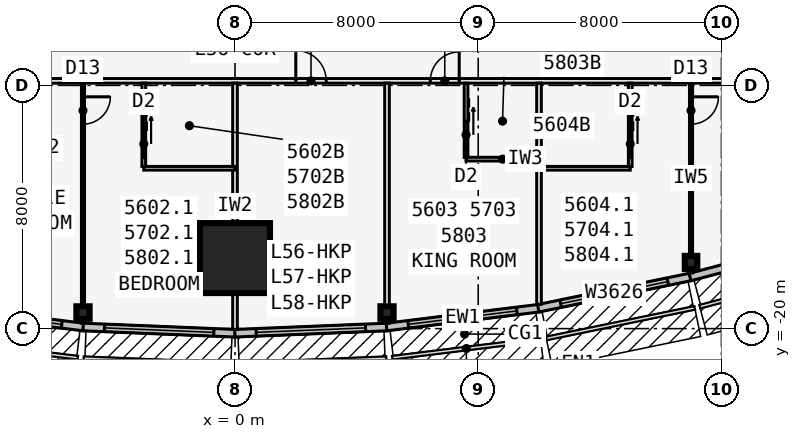
"""IFC4 building model, lengths in metres.
Left out: names, types, materials, properties, quantities, classifications, styles, units other than length and angle.
Written with IfcOpenShell. Run it as: python <this file> out.ifc"""

import sys

from ifc_helpers import new_model, si_unit, direction, frame, frame_2d, origin, origin_2d, place, context, subcontext, project, spatial, rectangle, i_section, extrude, element, fill, save


model = new_model("IFC4")
c1 = context("Model", 3, precision=1e-05, world=origin(), true_north=direction((0.0, 1.0)))
c2 = subcontext(c1, "Body", "Model", "MODEL_VIEW")
j1 = project(units=[si_unit("LENGTHUNIT", "METRE"), si_unit("PLANEANGLEUNIT", "RADIAN")], contexts=[c1])
p1 = place(None, origin())
s1 = spatial("IfcSite", under=j1, at=p1, CompositionType="ELEMENT")
p2 = place(p1, origin())
s2 = spatial("IfcBuilding", under=s1, at=p2, CompositionType="ELEMENT")
p3 = place(p2, frame((0.0, 0.0, 211.7)))
s3 = spatial("IfcBuildingStorey", under=s2, at=p3, CompositionType="ELEMENT", Elevation=211.7)
for number, where, z_axis, x_axis in (
    (1, (-5.0, -19.472, 0.0), (0.0, 0.0, 1.0), (0.0, -1.0, 0.0)),
    (2, (5.0, -19.472, 0.0), (0.0, 0.0, 1.0), (0.0, -1.0, 0.0)),
    (3, (15.0, -17.825, 0.0), (0.0, 0.0, 1.0), (1.0, 0.0, 0.0)),
):
    element("IfcColumn", number, at=place(p3, frame(where, z_axis=z_axis, x_axis=x_axis)), inside=s3, PredefinedType="COLUMN", context=c2, shape_type="SweptSolid", body=[
        extrude(i_section(OverallWidth=0.411, OverallDepth=0.434, WebThickness=0.036, FlangeThickness=0.057, at=origin_2d()), origin(), (0.0, 0.0, 1.0), 3.6),
    ])
p4 = place(p3, frame((0.0, -17.68, 0.0), z_axis=(0.0, 0.0, 1.0), x_axis=(0.0, -1.0, 0.0)))
e4 = element("IfcColumn", 4, at=p4, inside=s3, PredefinedType="COLUMN", context=c2, shape_type="SweptSolid", body=[
    extrude(rectangle(XDim=2.3, YDim=2.3, at=origin_2d()), origin(), (0.0, 0.0, 1.0), 3.6),
])
p5 = place(p3, frame((-9.985, -19.33, 0.0), z_axis=(0.0, 0.0, 1.0), x_axis=(0.992449874964, -0.12265090984, 0.0)))
e5 = element("IfcWall", 5, at=p5, inside=s3, PredefinedType="STANDARD", context=c2, shape_type="SweptSolid", body=[
    extrude(rectangle(XDim=5.038, YDim=0.25, at=frame_2d((2.519, 0.0))), origin(), (0.0, 0.0, 1.0), 3.435),
])
p6 = place(p5, frame((0.719, 0.0, 0.45)))
e6 = element("IfcOpeningElement", 6, at=p6, cuts=e5, PredefinedType="OPENING", context=c2, shape_type="SweptSolid", body=[
    extrude(rectangle(XDim=3.6, YDim=2.6, at=frame_2d((1.8, 1.3))), frame((0.0, 0.135, 0.0), z_axis=(0.0, -1.0, 0.0), x_axis=(1.0, 0.0, 0.0)), (0.0, 0.0, 1.0), 0.27),
])
p7 = place(p3, frame((-4.995, -19.947, 0.0), z_axis=(0.0, 0.0, 1.0), x_axis=(0.999151909423, -0.041175986892, 0.0)))
e7 = element("IfcWall", 7, at=p7, inside=s3, PredefinedType="STANDARD", context=c2, shape_type="SweptSolid", body=[
    extrude(rectangle(XDim=5.004, YDim=0.25, at=frame_2d((2.502, 0.0))), origin(), (0.0, 0.0, 1.0), 3.435),
])
p8 = place(p7, frame((0.702, 0.0, 0.45)))
e8 = element("IfcOpeningElement", 8, at=p8, cuts=e7, PredefinedType="OPENING", context=c2, shape_type="SweptSolid", body=[
    extrude(rectangle(XDim=3.6, YDim=2.6, at=frame_2d((1.8, 1.3))), frame((0.0, 0.135, 0.0), z_axis=(0.0, -1.0, 0.0), x_axis=(1.0, 0.0, 0.0)), (0.0, 0.0, 1.0), 0.27),
])
p9 = place(p3, frame((-0.005, -20.153, 0.0), z_axis=(0.0, 0.0, 1.0), x_axis=(0.999151909423, 0.041175986892, 0.0)))
e9 = element("IfcWall", 9, at=p9, inside=s3, PredefinedType="STANDARD", context=c2, shape_type="SweptSolid", body=[
    extrude(rectangle(XDim=5.004, YDim=0.25, at=frame_2d((2.502, 0.0))), origin(), (0.0, 0.0, 1.0), 3.435),
])
p10 = place(p9, frame((0.702, 0.0, 0.45)))
e10 = element("IfcOpeningElement", 10, at=p10, cuts=e9, PredefinedType="OPENING", context=c2, shape_type="SweptSolid", body=[
    extrude(rectangle(XDim=3.6, YDim=2.6, at=frame_2d((1.8, 1.3))), frame((0.0, 0.135, 0.0), z_axis=(0.0, -1.0, 0.0), x_axis=(1.0, 0.0, 0.0)), (0.0, 0.0, 1.0), 0.27),
])
p11 = place(p3, frame((4.985, -19.948, 0.0), z_axis=(0.0, 0.0, 1.0), x_axis=(0.992449874964, 0.12265090984, 0.0)))
e11 = element("IfcWall", 11, at=p11, inside=s3, PredefinedType="STANDARD", context=c2, shape_type="SweptSolid", body=[
    extrude(rectangle(XDim=5.038, YDim=0.25, at=frame_2d((2.519, 0.0))), origin(), (0.0, 0.0, 1.0), 3.435),
])
p12 = place(p11, frame((0.719, 0.0, 0.45)))
e12 = element("IfcOpeningElement", 12, at=p12, cuts=e11, PredefinedType="OPENING", context=c2, shape_type="SweptSolid", body=[
    extrude(rectangle(XDim=3.6, YDim=2.6, at=frame_2d((1.8, 1.3))), frame((0.0, 0.135, 0.0), z_axis=(0.0, -1.0, 0.0), x_axis=(1.0, 0.0, 0.0)), (0.0, 0.0, 1.0), 0.27),
])
p13 = place(p3, frame((9.975, -19.332, 0.0), z_axis=(0.0, 0.0, 1.0), x_axis=(0.979461488189, 0.201631329795, 0.0)))
e13 = element("IfcWall", 13, at=p13, inside=s3, PredefinedType="STANDARD", context=c2, shape_type="SweptSolid", body=[
    extrude(rectangle(XDim=5.105, YDim=0.25, at=frame_2d((2.552, 0.0))), origin(), (0.0, 0.0, 1.0), 3.435),
])
p14 = place(p13, frame((0.752, 0.0, 0.45)))
e14 = element("IfcOpeningElement", 14, at=p14, cuts=e13, PredefinedType="OPENING", context=c2, shape_type="SweptSolid", body=[
    extrude(rectangle(XDim=3.6, YDim=2.6, at=frame_2d((1.8, 1.3))), frame((0.0, 0.135, 0.0), z_axis=(0.0, -1.0, 0.0), x_axis=(1.0, 0.0, 0.0)), (0.0, 0.0, 1.0), 0.27),
])
p15 = place(p3, frame((14.968, -18.304, 0.0), z_axis=(0.0, 0.0, 1.0), x_axis=(0.967010286052, 0.254737328772, 0.0)))
e15 = element("IfcWall", 15, at=p15, inside=s3, PredefinedType="STANDARD", context=c2, shape_type="SweptSolid", body=[
    extrude(rectangle(XDim=2.068, YDim=0.25, at=frame_2d((1.034, 0.0))), origin(), (0.0, 0.0, 1.0), 3.435),
])
p16 = place(p3, frame((-19.677, -11.851, 0.0), z_axis=(0.0, 0.0, 1.0), x_axis=(1.0, 0.0, 0.0)))
e16 = element("IfcWall", 16, at=p16, inside=s3, PredefinedType="PARTITIONING", context=c2, shape_type="SweptSolid", body=[
    extrude(rectangle(XDim=39.354, YDim=0.15, at=frame_2d((19.677, 0.0))), origin(), (0.0, 0.0, 1.0), 3.435),
])
p17 = place(p16, frame((1.665, 0.0, 0.0)))
e17 = element("IfcOpeningElement", 17, at=p17, cuts=e16, PredefinedType="OPENING", context=c2, shape_type="SweptSolid", body=[
    extrude(rectangle(XDim=0.95, YDim=2.13, at=frame_2d((0.475, 1.065))), frame((0.0, 0.085, 0.0), z_axis=(0.0, -1.0, 0.0), x_axis=(1.0, 0.0, 0.0)), (0.0, 0.0, 1.0), 0.17),
])
p18 = place(p16, frame((11.702, 0.0, 0.0)))
e18 = element("IfcOpeningElement", 18, at=p18, cuts=e16, PredefinedType="OPENING", context=c2, shape_type="SweptSolid", body=[
    extrude(rectangle(XDim=0.95, YDim=2.13, at=frame_2d((0.475, 1.065))), frame((0.0, 0.085, 0.0), z_axis=(0.0, -1.0, 0.0), x_axis=(1.0, 0.0, 0.0)), (0.0, 0.0, 1.0), 0.17),
])
p19 = place(p16, frame((21.677, 0.0, 0.0)))
e19 = element("IfcOpeningElement", 19, at=p19, cuts=e16, PredefinedType="OPENING", context=c2, shape_type="SweptSolid", body=[
    extrude(rectangle(XDim=1.0, YDim=2.13, at=frame_2d((0.5, 1.065))), frame((0.0, 0.085, 0.0), z_axis=(0.0, -1.0, 0.0), x_axis=(1.0, 0.0, 0.0)), (0.0, 0.0, 1.0), 0.17),
])
p20 = place(p16, frame((26.102, 0.0, 0.0)))
e20 = element("IfcOpeningElement", 20, at=p20, cuts=e16, PredefinedType="OPENING", context=c2, shape_type="SweptSolid", body=[
    extrude(rectangle(XDim=0.95, YDim=2.13, at=frame_2d((0.475, 1.065))), frame((0.0, 0.085, 0.0), z_axis=(0.0, -1.0, 0.0), x_axis=(1.0, 0.0, 0.0)), (0.0, 0.0, 1.0), 0.17),
])
p21 = place(p16, frame((36.739, 0.0, 0.0)))
e21 = element("IfcOpeningElement", 21, at=p21, cuts=e16, PredefinedType="OPENING", context=c2, shape_type="SweptSolid", body=[
    extrude(rectangle(XDim=0.95, YDim=2.13, at=frame_2d((0.475, 1.065))), frame((0.0, 0.085, 0.0), z_axis=(0.0, -1.0, 0.0), x_axis=(1.0, 0.0, 0.0)), (0.0, 0.0, 1.0), 0.17),
])
p22 = place(p3, frame((-5.0, -11.926, 0.0), z_axis=(0.0, 0.0, 1.0), x_axis=(0.0, -1.0, 0.0)))
e22 = element("IfcWall", 22, at=p22, inside=s3, PredefinedType="PARTITIONING", context=c2, shape_type="SweptSolid", body=[
    extrude(rectangle(XDim=7.894, YDim=0.1, at=frame_2d((3.947, 0.0))), origin(), (0.0, 0.0, 1.0), 2.589),
])
p23 = place(p22, frame((0.45, 0.0, 0.0)))
e23 = element("IfcOpeningElement", 23, at=p23, cuts=e22, PredefinedType="OPENING", context=c2, shape_type="SweptSolid", body=[
    extrude(rectangle(XDim=0.9, YDim=2.13, at=frame_2d((0.45, 1.065))), frame((0.0, 0.06, 0.0), z_axis=(0.0, -1.0, 0.0), x_axis=(1.0, 0.0, 0.0)), (0.0, 0.0, 1.0), 0.12),
])
p24 = place(p3, frame((0.0, -11.926, 0.0), z_axis=(0.0, 0.0, 1.0), x_axis=(0.0, -1.0, 0.0)))
e24 = element("IfcWall", 24, at=p24, inside=s3, PredefinedType="PARTITIONING", context=c2, shape_type="SweptSolid", body=[
    extrude(rectangle(XDim=8.101, YDim=0.15, at=frame_2d((4.051, 0.0))), origin(), (0.0, 0.0, 1.0), 2.589),
])
p25 = place(p3, frame((5.0, -11.926, 0.0), z_axis=(0.0, 0.0, 1.0), x_axis=(0.0, -1.0, 0.0)))
e25 = element("IfcWall", 25, at=p25, inside=s3, PredefinedType="PARTITIONING", context=c2, shape_type="SweptSolid", body=[
    extrude(rectangle(XDim=7.894, YDim=0.15, at=frame_2d((3.947, 0.0))), origin(), (0.0, 0.0, 1.0), 2.589),
])
p26 = place(p3, frame((10.0, -11.926, 0.0), z_axis=(0.0, 0.0, 1.0), x_axis=(0.0, -1.0, 0.0)))
e26 = element("IfcWall", 26, at=p26, inside=s3, PredefinedType="PARTITIONING", context=c2, shape_type="SweptSolid", body=[
    extrude(rectangle(XDim=7.273, YDim=0.15, at=frame_2d((3.636, 0.0))), origin(), (0.0, 0.0, 1.0), 2.589),
])
p27 = place(p3, frame((15.0, -11.926, 0.0), z_axis=(0.0, 0.0, 1.0), x_axis=(0.0, -1.0, 0.0)))
e27 = element("IfcWall", 27, at=p27, inside=s3, PredefinedType="PARTITIONING", context=c2, shape_type="SweptSolid", body=[
    extrude(rectangle(XDim=6.24, YDim=0.1, at=frame_2d((3.12, 0.0))), origin(), (0.0, 0.0, 1.0), 2.589),
])
p28 = place(p27, frame((0.45, 0.0, 0.0)))
e28 = element("IfcOpeningElement", 28, at=p28, cuts=e27, PredefinedType="OPENING", context=c2, shape_type="SweptSolid", body=[
    extrude(rectangle(XDim=0.9, YDim=2.13, at=frame_2d((0.45, 1.065))), frame((0.0, 0.06, 0.0), z_axis=(0.0, -1.0, 0.0), x_axis=(1.0, 0.0, 0.0)), (0.0, 0.0, 1.0), 0.12),
])
p29 = place(p3, frame((-3.0, -14.726, 0.0), z_axis=(0.0, 0.0, 1.0), x_axis=(1.0, 0.0, 0.0)))
e29 = element("IfcWall", 29, at=p29, inside=s3, PredefinedType="PLUMBINGWALL", context=c2, shape_type="SweptSolid", body=[
    extrude(rectangle(XDim=3.0, YDim=0.12, at=frame_2d((1.5, 0.0))), origin(), (0.0, 0.0, 1.0), 3.435),
])
p30 = place(p3, frame((-3.0, -11.926, 0.0), z_axis=(0.0, 0.0, 1.0), x_axis=(0.0, -1.0, 0.0)))
e30 = element("IfcWall", 30, at=p30, inside=s3, PredefinedType="PLUMBINGWALL", context=c2, shape_type="SweptSolid", body=[
    extrude(rectangle(XDim=2.74, YDim=0.12, at=frame_2d((1.37, 0.0))), origin(), (0.0, 0.0, 1.0), 3.435),
])
p31 = place(p30, frame((1.55, 0.0, 0.0)))
e31 = element("IfcOpeningElement", 31, at=p31, cuts=e30, PredefinedType="OPENING", context=c2, shape_type="SweptSolid", body=[
    extrude(rectangle(XDim=0.9, YDim=2.13, at=frame_2d((0.45, 1.065))), frame((0.0, 0.07, 0.0), z_axis=(0.0, -1.0, 0.0), x_axis=(1.0, 0.0, 0.0)), (0.0, 0.0, 1.0), 0.14),
])
p32 = place(p3, frame((7.6, -14.426, 0.0), z_axis=(0.0, 0.0, 1.0), x_axis=(1.0, 0.0, 0.0)))
e32 = element("IfcWall", 32, at=p32, inside=s3, PredefinedType="PLUMBINGWALL", context=c2, shape_type="SweptSolid", body=[
    extrude(rectangle(XDim=2.4, YDim=0.12, at=frame_2d((1.2, 0.0))), origin(), (0.0, 0.0, 1.0), 3.435),
])
p33 = place(p3, frame((7.6, -11.926, 0.0), z_axis=(0.0, 0.0, 1.0), x_axis=(0.0, -1.0, 0.0)))
e33 = element("IfcWall", 33, at=p33, inside=s3, PredefinedType="PLUMBINGWALL", context=c2, shape_type="SweptSolid", body=[
    extrude(rectangle(XDim=2.44, YDim=0.12, at=frame_2d((1.22, 0.0))), origin(), (0.0, 0.0, 1.0), 3.435),
])
p34 = place(p33, frame((1.25, 0.0, 0.0)))
e34 = element("IfcOpeningElement", 34, at=p34, cuts=e33, PredefinedType="OPENING", context=c2, shape_type="SweptSolid", body=[
    extrude(rectangle(XDim=0.9, YDim=2.13, at=frame_2d((0.45, 1.065))), frame((0.0, 0.07, 0.0), z_axis=(0.0, -1.0, 0.0), x_axis=(1.0, 0.0, 0.0)), (0.0, 0.0, 1.0), 0.14),
])
p35 = place(p3, frame((10.0, -14.726, 0.0), z_axis=(0.0, 0.0, 1.0), x_axis=(1.0, 0.0, 0.0)))
e35 = element("IfcWall", 35, at=p35, inside=s3, PredefinedType="PLUMBINGWALL", context=c2, shape_type="SweptSolid", body=[
    extrude(rectangle(XDim=3.0, YDim=0.12, at=frame_2d((1.5, 0.0))), origin(), (0.0, 0.0, 1.0), 3.435),
])
p36 = place(p3, frame((13.0, -11.926, 0.0), z_axis=(0.0, 0.0, 1.0), x_axis=(0.0, -1.0, 0.0)))
e36 = element("IfcWall", 36, at=p36, inside=s3, PredefinedType="PLUMBINGWALL", context=c2, shape_type="SweptSolid", body=[
    extrude(rectangle(XDim=2.74, YDim=0.12, at=frame_2d((1.37, 0.0))), origin(), (0.0, 0.0, 1.0), 3.435),
])
p37 = place(p36, frame((1.55, 0.0, 0.0)))
e37 = element("IfcOpeningElement", 37, at=p37, cuts=e36, PredefinedType="OPENING", context=c2, shape_type="SweptSolid", body=[
    extrude(rectangle(XDim=0.9, YDim=2.13, at=frame_2d((0.45, 1.065))), frame((0.0, 0.07, 0.0), z_axis=(0.0, -1.0, 0.0), x_axis=(1.0, 0.0, 0.0)), (0.0, 0.0, 1.0), 0.14),
])
p38 = place(p3, frame((21.661, -12.015, 0.0), z_axis=(0.0, 0.0, 1.0), x_axis=(-0.500000605707, 0.866025054079, 0.0)))
e38 = element("IfcWall", 38, at=p38, inside=s3, PredefinedType="PARTITIONING", context=c2, shape_type="SweptSolid", body=[
    extrude(rectangle(XDim=42.472, YDim=0.15, at=frame_2d((21.236, 0.0))), origin(), (0.0, 0.0, 1.0), 3.435),
])
p39 = place(p38, frame((2.661, 0.0, 0.0)))
e39 = element("IfcOpeningElement", 39, at=p39, cuts=e38, PredefinedType="OPENING", context=c2, shape_type="SweptSolid", body=[
    extrude(rectangle(XDim=0.95, YDim=2.13, at=frame_2d((0.475, 1.065))), frame((0.0, 0.085, 0.0), z_axis=(0.0, -1.0, 0.0), x_axis=(1.0, 0.0, 0.0)), (0.0, 0.0, 1.0), 0.17),
])
p40 = place(p38, frame((7.061, 0.0, 0.0)))
e40 = element("IfcOpeningElement", 40, at=p40, cuts=e38, PredefinedType="OPENING", context=c2, shape_type="SweptSolid", body=[
    extrude(rectangle(XDim=0.95, YDim=2.13, at=frame_2d((0.475, 1.065))), frame((0.0, 0.085, 0.0), z_axis=(0.0, -1.0, 0.0), x_axis=(1.0, 0.0, 0.0)), (0.0, 0.0, 1.0), 0.17),
])
p41 = place(p38, frame((13.861, 0.0, 0.0)))
e41 = element("IfcOpeningElement", 41, at=p41, cuts=e38, PredefinedType="OPENING", context=c2, shape_type="SweptSolid", body=[
    extrude(rectangle(XDim=0.95, YDim=2.13, at=frame_2d((0.475, 1.065))), frame((0.0, 0.085, 0.0), z_axis=(0.0, -1.0, 0.0), x_axis=(1.0, 0.0, 0.0)), (0.0, 0.0, 1.0), 0.17),
])
p42 = place(p38, frame((22.061, 0.0, 0.0)))
e42 = element("IfcOpeningElement", 42, at=p42, cuts=e38, PredefinedType="OPENING", context=c2, shape_type="SweptSolid", body=[
    extrude(rectangle(XDim=0.95, YDim=2.13, at=frame_2d((0.475, 1.065))), frame((0.0, 0.085, 0.0), z_axis=(0.0, -1.0, 0.0), x_axis=(1.0, 0.0, 0.0)), (0.0, 0.0, 1.0), 0.17),
])
p43 = place(p38, frame((28.261, 0.0, 0.0)))
e43 = element("IfcOpeningElement", 43, at=p43, cuts=e38, PredefinedType="OPENING", context=c2, shape_type="SweptSolid", body=[
    extrude(rectangle(XDim=0.95, YDim=2.13, at=frame_2d((0.475, 1.065))), frame((0.0, 0.085, 0.0), z_axis=(0.0, -1.0, 0.0), x_axis=(1.0, 0.0, 0.0)), (0.0, 0.0, 1.0), 0.17),
])
p44 = place(p38, frame((38.861, 0.0, 0.0)))
e44 = element("IfcOpeningElement", 44, at=p44, cuts=e38, PredefinedType="OPENING", context=c2, shape_type="SweptSolid", body=[
    extrude(rectangle(XDim=0.95, YDim=2.13, at=frame_2d((0.475, 1.065))), frame((0.0, 0.085, 0.0), z_axis=(0.0, -1.0, 0.0), x_axis=(1.0, 0.0, 0.0)), (0.0, 0.0, 1.0), 0.17),
])
p45 = place(p3, frame((-0.425, 22.966, 0.0), z_axis=(0.0, 0.0, 1.0), x_axis=(-0.500000265775, -0.866025250339, 0.0)))
e45 = element("IfcWall", 45, at=p45, inside=s3, PredefinedType="PARTITIONING", context=c2, shape_type="SweptSolid", body=[
    extrude(rectangle(XDim=39.354, YDim=0.15, at=frame_2d((19.677, 0.0))), origin(), (0.0, 0.0, 1.0), 3.435),
])
p46 = place(p45, frame((1.102, 0.0, 0.0)))
e46 = element("IfcOpeningElement", 46, at=p46, cuts=e45, PredefinedType="OPENING", context=c2, shape_type="SweptSolid", body=[
    extrude(rectangle(XDim=0.95, YDim=2.13, at=frame_2d((0.475, 1.065))), frame((0.0, 0.085, 0.0), z_axis=(0.0, -1.0, 0.0), x_axis=(1.0, 0.0, 0.0)), (0.0, 0.0, 1.0), 0.17),
])
p47 = place(p45, frame((6.702, 0.0, 0.0)))
e47 = element("IfcOpeningElement", 47, at=p47, cuts=e45, PredefinedType="OPENING", context=c2, shape_type="SweptSolid", body=[
    extrude(rectangle(XDim=0.95, YDim=2.13, at=frame_2d((0.475, 1.065))), frame((0.0, 0.085, 0.0), z_axis=(0.0, -1.0, 0.0), x_axis=(1.0, 0.0, 0.0)), (0.0, 0.0, 1.0), 0.17),
])
p48 = place(p45, frame((16.702, 0.0, 0.0)))
e48 = element("IfcOpeningElement", 48, at=p48, cuts=e45, PredefinedType="OPENING", context=c2, shape_type="SweptSolid", body=[
    extrude(rectangle(XDim=0.95, YDim=2.13, at=frame_2d((0.475, 1.065))), frame((0.0, 0.085, 0.0), z_axis=(0.0, -1.0, 0.0), x_axis=(1.0, 0.0, 0.0)), (0.0, 0.0, 1.0), 0.17),
])
p49 = place(p45, frame((26.102, 0.0, 0.0)))
e49 = element("IfcOpeningElement", 49, at=p49, cuts=e45, PredefinedType="OPENING", context=c2, shape_type="SweptSolid", body=[
    extrude(rectangle(XDim=0.95, YDim=2.13, at=frame_2d((0.475, 1.065))), frame((0.0, 0.085, 0.0), z_axis=(0.0, -1.0, 0.0), x_axis=(1.0, 0.0, 0.0)), (0.0, 0.0, 1.0), 0.17),
])
p50 = place(p45, frame((32.302, 0.0, 0.0)))
e50 = element("IfcOpeningElement", 50, at=p50, cuts=e45, PredefinedType="OPENING", context=c2, shape_type="SweptSolid", body=[
    extrude(rectangle(XDim=0.95, YDim=2.13, at=frame_2d((0.475, 1.065))), frame((0.0, 0.085, 0.0), z_axis=(0.0, -1.0, 0.0), x_axis=(1.0, 0.0, 0.0)), (0.0, 0.0, 1.0), 0.17),
])
p51 = place(p45, frame((37.302, 0.0, 0.0)))
e51 = element("IfcOpeningElement", 51, at=p51, cuts=e45, PredefinedType="OPENING", context=c2, shape_type="SweptSolid", body=[
    extrude(rectangle(XDim=0.95, YDim=2.13, at=frame_2d((0.475, 1.065))), frame((0.0, 0.085, 0.0), z_axis=(0.0, -1.0, 0.0), x_axis=(1.0, 0.0, 0.0)), (0.0, 0.0, 1.0), 0.17),
])
p52 = place(p6, origin())
e52 = element("IfcWindow", 52, at=p52, inside=s3, PartitioningType="SINGLE_PANEL", PredefinedType="WINDOW", context=c2, shape_type="SweptSolid", body=[
    extrude(rectangle(XDim=3.6, YDim=2.6, at=frame_2d((1.8, 1.3))), frame((0.0, 0.03, 0.0), z_axis=(0.0, -1.0, 0.0), x_axis=(1.0, 0.0, 0.0)), (0.0, 0.0, 1.0), 0.06),
])
fill(e6, e52)
p53 = place(p8, origin())
e53 = element("IfcWindow", 53, at=p53, inside=s3, PartitioningType="SINGLE_PANEL", PredefinedType="WINDOW", context=c2, shape_type="SweptSolid", body=[
    extrude(rectangle(XDim=3.6, YDim=2.6, at=frame_2d((1.8, 1.3))), frame((0.0, 0.03, 0.0), z_axis=(0.0, -1.0, 0.0), x_axis=(1.0, 0.0, 0.0)), (0.0, 0.0, 1.0), 0.06),
])
fill(e8, e53)
p54 = place(p10, origin())
e54 = element("IfcWindow", 54, at=p54, inside=s3, PartitioningType="SINGLE_PANEL", PredefinedType="WINDOW", context=c2, shape_type="SweptSolid", body=[
    extrude(rectangle(XDim=3.6, YDim=2.6, at=frame_2d((1.8, 1.3))), frame((0.0, 0.03, 0.0), z_axis=(0.0, -1.0, 0.0), x_axis=(1.0, 0.0, 0.0)), (0.0, 0.0, 1.0), 0.06),
])
fill(e10, e54)
p55 = place(p12, origin())
e55 = element("IfcWindow", 55, at=p55, inside=s3, PartitioningType="SINGLE_PANEL", PredefinedType="WINDOW", context=c2, shape_type="SweptSolid", body=[
    extrude(rectangle(XDim=3.6, YDim=2.6, at=frame_2d((1.8, 1.3))), frame((0.0, 0.03, 0.0), z_axis=(0.0, -1.0, 0.0), x_axis=(1.0, 0.0, 0.0)), (0.0, 0.0, 1.0), 0.06),
])
fill(e12, e55)
p56 = place(p14, origin())
e56 = element("IfcWindow", 56, at=p56, inside=s3, PartitioningType="SINGLE_PANEL", PredefinedType="WINDOW", context=c2, shape_type="SweptSolid", body=[
    extrude(rectangle(XDim=3.6, YDim=2.6, at=frame_2d((1.8, 1.3))), frame((0.0, 0.03, 0.0), z_axis=(0.0, -1.0, 0.0), x_axis=(1.0, 0.0, 0.0)), (0.0, 0.0, 1.0), 0.06),
])
fill(e14, e56)
p57 = place(p23, origin())
e57 = element("IfcDoor", 57, at=p57, inside=s3, OperationType="SINGLE_SWING_LEFT", PredefinedType="DOOR", context=c2, shape_type="SweptSolid", body=[
    extrude(rectangle(XDim=0.9, YDim=2.13, at=frame_2d((0.45, 1.065))), frame((0.0, 0.025, 0.0), z_axis=(0.0, -1.0, 0.0), x_axis=(1.0, 0.0, 0.0)), (0.0, 0.0, 1.0), 0.05),
])
fill(e23, e57)
p58 = place(p28, origin())
e58 = element("IfcDoor", 58, at=p58, inside=s3, OperationType="SINGLE_SWING_LEFT", PredefinedType="DOOR", context=c2, shape_type="SweptSolid", body=[
    extrude(rectangle(XDim=0.9, YDim=2.13, at=frame_2d((0.45, 1.065))), frame((0.0, 0.025, 0.0), z_axis=(0.0, -1.0, 0.0), x_axis=(1.0, 0.0, 0.0)), (0.0, 0.0, 1.0), 0.05),
])
fill(e28, e58)
p59 = place(p31, origin())
e59 = element("IfcDoor", 59, at=p59, inside=s3, OperationType="SLIDING_TO_LEFT", PredefinedType="DOOR", context=c2, shape_type="SweptSolid", body=[
    extrude(rectangle(XDim=0.9, YDim=2.13, at=frame_2d((0.45, 1.065))), frame((0.0, 0.025, 0.0), z_axis=(0.0, -1.0, 0.0), x_axis=(1.0, 0.0, 0.0)), (0.0, 0.0, 1.0), 0.05),
])
fill(e31, e59)
p60 = place(p19, origin())
e60 = element("IfcDoor", 60, at=p60, inside=s3, OperationType="SINGLE_SWING_LEFT", PredefinedType="DOOR", context=c2, shape_type="SweptSolid", body=[
    extrude(rectangle(XDim=1.0, YDim=2.13, at=frame_2d((0.5, 1.065))), frame((0.0, 0.025, 0.0), z_axis=(0.0, -1.0, 0.0), x_axis=(1.0, 0.0, 0.0)), (0.0, 0.0, 1.0), 0.05),
])
fill(e19, e60)
p61 = place(p34, origin())
e61 = element("IfcDoor", 61, at=p61, inside=s3, OperationType="SLIDING_TO_LEFT", PredefinedType="DOOR", context=c2, shape_type="SweptSolid", body=[
    extrude(rectangle(XDim=0.9, YDim=2.13, at=frame_2d((0.45, 1.065))), frame((0.0, 0.025, 0.0), z_axis=(0.0, -1.0, 0.0), x_axis=(1.0, 0.0, 0.0)), (0.0, 0.0, 1.0), 0.05),
])
fill(e34, e61)
p62 = place(p20, origin())
e62 = element("IfcDoor", 62, at=p62, inside=s3, OperationType="SINGLE_SWING_RIGHT", PredefinedType="DOOR", context=c2, shape_type="SweptSolid", body=[
    extrude(rectangle(XDim=0.95, YDim=2.13, at=frame_2d((0.475, 1.065))), frame((0.0, 0.025, 0.0), z_axis=(0.0, -1.0, 0.0), x_axis=(1.0, 0.0, 0.0)), (0.0, 0.0, 1.0), 0.05),
])
fill(e20, e62)
p63 = place(p37, origin())
e63 = element("IfcDoor", 63, at=p63, inside=s3, OperationType="SLIDING_TO_LEFT", PredefinedType="DOOR", context=c2, shape_type="SweptSolid", body=[
    extrude(rectangle(XDim=0.9, YDim=2.13, at=frame_2d((0.45, 1.065))), frame((0.0, 0.025, 0.0), z_axis=(0.0, -1.0, 0.0), x_axis=(1.0, 0.0, 0.0)), (0.0, 0.0, 1.0), 0.05),
])
fill(e37, e63)
save(model, sys.argv[1])
